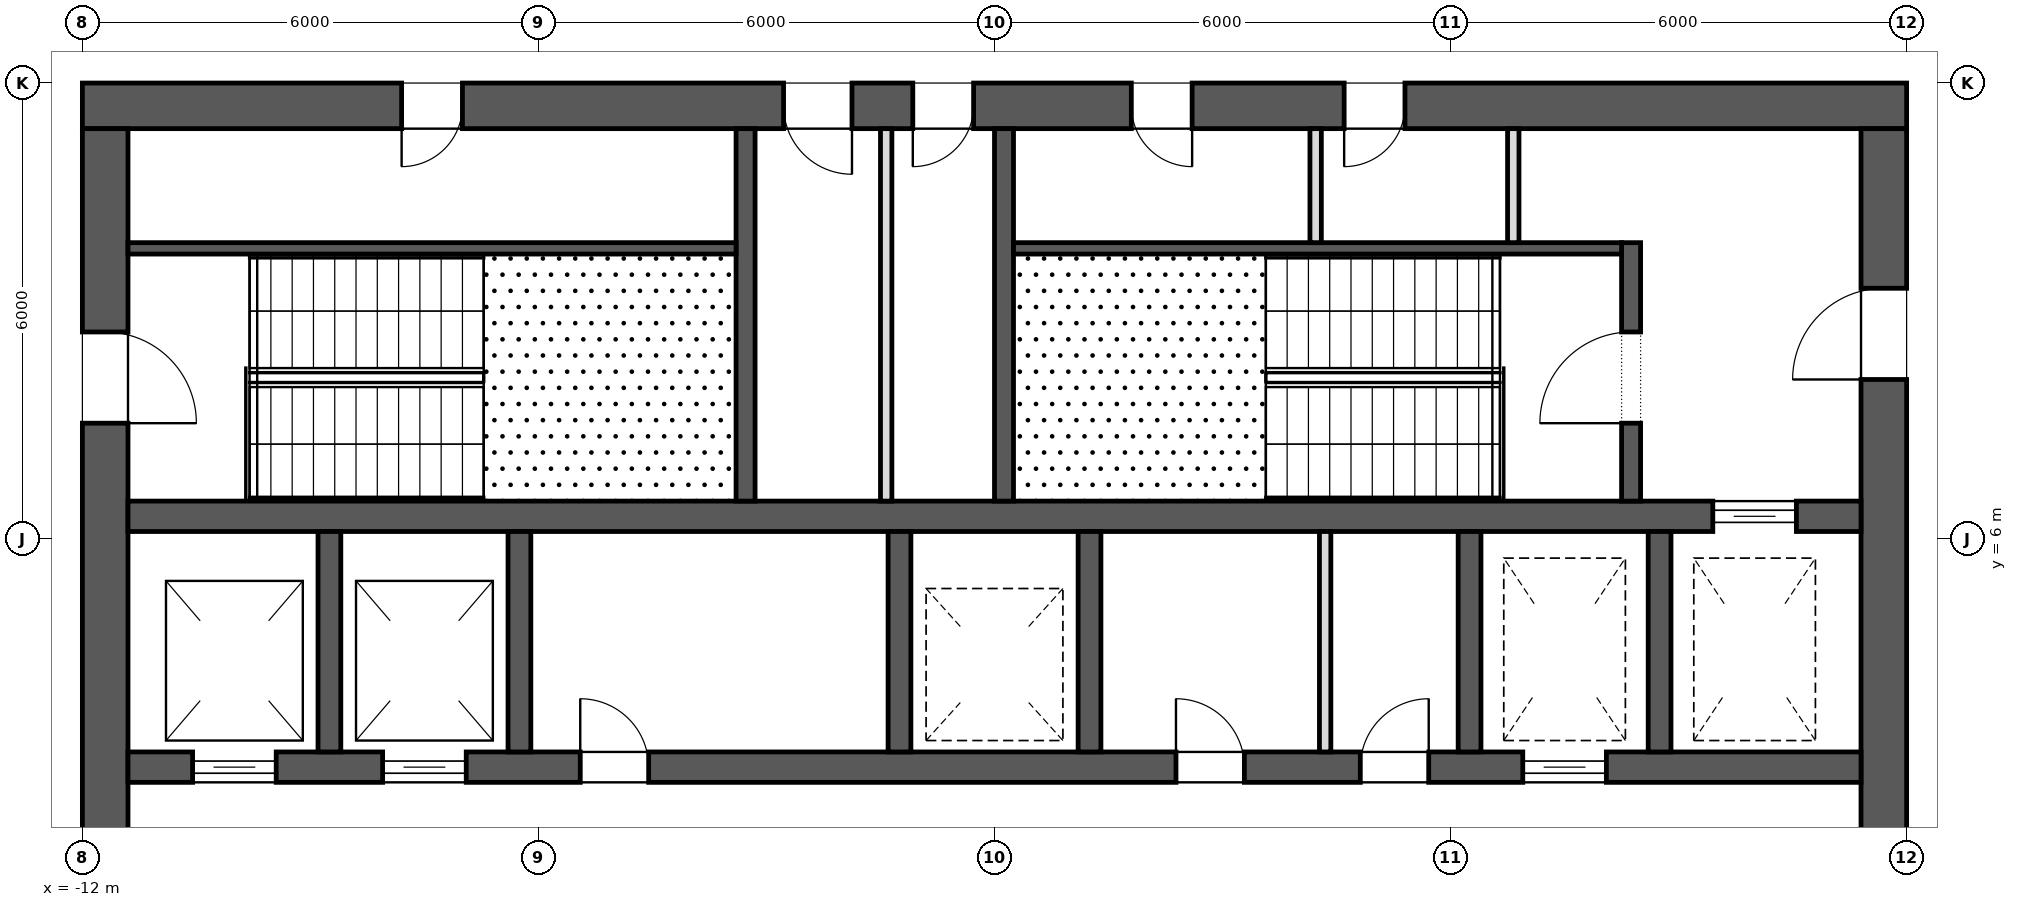
"""IFC4 building model, lengths in metres.
Left out: names, types, materials, properties, quantities, classifications, styles, units other than length and angle.
Written with IfcOpenShell. Run it as: python <this file> out.ifc"""

import sys

from ifc_helpers import new_model, si_unit, direction, frame, frame_2d, origin, place, context, subcontext, project, spatial, rectangle, extrude, element, fill, save


model = new_model("IFC4")
c1 = context("Model", 3, precision=1e-05, world=origin(), true_north=direction((0.0, 1.0)))
c2 = subcontext(c1, "Body", "Model", "MODEL_VIEW")
j1 = project(units=[si_unit("LENGTHUNIT", "METRE"), si_unit("PLANEANGLEUNIT", "RADIAN")], contexts=[c1])
p1 = place(None, origin())
s1 = spatial("IfcSite", under=j1, at=p1, CompositionType="ELEMENT")
p2 = place(p1, origin())
s2 = spatial("IfcBuilding", under=s1, at=p2, CompositionType="ELEMENT")
p3 = place(p2, frame((0.0, 0.0, 288.3)))
s3 = spatial("IfcBuildingStorey", under=s2, at=p3, CompositionType="ELEMENT", Elevation=288.3)
p4 = place(p3, frame((-12.0, 11.7, 0.0), z_axis=(0.0, 0.0, 1.0), x_axis=(1.0, 0.0, 0.0)))
e1 = element("IfcWall", 1, at=p4, inside=s3, PredefinedType="SHEAR", context=c2, shape_type="SweptSolid", body=[
    extrude(rectangle(XDim=24.0, YDim=0.6, at=frame_2d((12.0, 0.0))), origin(), (0.0, 0.0, 1.0), 4.0),
])
p5 = place(p4, frame((9.225, 0.0, 0.0)))
e2 = element("IfcOpeningElement", 2, at=p5, cuts=e1, PredefinedType="OPENING", context=c2, shape_type="SweptSolid", body=[
    extrude(rectangle(XDim=0.9, YDim=2.1, at=frame_2d((0.45, 1.05))), frame((0.0, 0.312, 0.0), z_axis=(0.0, -1.0, 0.0), x_axis=(1.0, 0.0, 0.0)), (0.0, 0.0, 1.0), 0.624),
])
p6 = place(p4, frame((10.925, 0.0, 0.0)))
e3 = element("IfcOpeningElement", 3, at=p6, cuts=e1, PredefinedType="OPENING", context=c2, shape_type="SweptSolid", body=[
    extrude(rectangle(XDim=0.8, YDim=2.1, at=frame_2d((0.4, 1.05))), frame((0.0, 0.312, 0.0), z_axis=(0.0, -1.0, 0.0), x_axis=(1.0, 0.0, 0.0)), (0.0, 0.0, 1.0), 0.624),
])
p7 = place(p4, frame((4.2, 0.0, 0.0)))
e4 = element("IfcOpeningElement", 4, at=p7, cuts=e1, PredefinedType="OPENING", context=c2, shape_type="SweptSolid", body=[
    extrude(rectangle(XDim=0.8, YDim=2.1, at=frame_2d((0.4, 1.05))), frame((0.0, 0.312, 0.0), z_axis=(0.0, -1.0, 0.0), x_axis=(1.0, 0.0, 0.0)), (0.0, 0.0, 1.0), 0.624),
])
p8 = place(p4, frame((13.8, 0.0, 0.0)))
e5 = element("IfcOpeningElement", 5, at=p8, cuts=e1, PredefinedType="OPENING", context=c2, shape_type="SweptSolid", body=[
    extrude(rectangle(XDim=0.8, YDim=2.1, at=frame_2d((0.4, 1.05))), frame((0.0, 0.312, 0.0), z_axis=(0.0, -1.0, 0.0), x_axis=(1.0, 0.0, 0.0)), (0.0, 0.0, 1.0), 0.624),
])
p9 = place(p4, frame((16.6, 0.0, 0.0)))
e6 = element("IfcOpeningElement", 6, at=p9, cuts=e1, PredefinedType="OPENING", context=c2, shape_type="SweptSolid", body=[
    extrude(rectangle(XDim=0.8, YDim=2.1, at=frame_2d((0.4, 1.05))), frame((0.0, 0.312, 0.0), z_axis=(0.0, -1.0, 0.0), x_axis=(1.0, 0.0, 0.0)), (0.0, 0.0, 1.0), 0.624),
])
p10 = place(p3, frame((11.7, -11.4, 0.0), z_axis=(0.0, 0.0, 1.0), x_axis=(0.0, 1.0, 0.0)))
e7 = element("IfcWall", 7, at=p10, inside=s3, PredefinedType="SHEAR", context=c2, shape_type="SweptSolid", body=[
    extrude(rectangle(XDim=22.8, YDim=0.6, at=frame_2d((11.4, 0.0))), origin(), (0.0, 0.0, 1.0), 4.0),
])
p11 = place(p10, frame((10.2, 0.0, 0.0)))
e8 = element("IfcOpeningElement", 8, at=p11, cuts=e7, PredefinedType="OPENING", context=c2, shape_type="SweptSolid", body=[
    extrude(rectangle(XDim=2.4, YDim=2.1, at=frame_2d((1.2, 1.05))), frame((0.0, 0.312, 0.0), z_axis=(0.0, -1.0, 0.0), x_axis=(1.0, 0.0, 0.0)), (0.0, 0.0, 1.0), 0.624),
])
p12 = place(p10, frame((19.5, 0.0, 0.0)))
e9 = element("IfcOpeningElement", 9, at=p12, cuts=e7, PredefinedType="OPENING", context=c2, shape_type="SweptSolid", body=[
    extrude(rectangle(XDim=1.2, YDim=2.1, at=frame_2d((0.6, 1.05))), frame((0.0, 0.312, 0.0), z_axis=(0.0, -1.0, 0.0), x_axis=(1.0, 0.0, 0.0)), (0.0, 0.0, 1.0), 0.624),
])
p13 = place(p10, frame((2.1, 0.0, 0.0)))
e10 = element("IfcOpeningElement", 10, at=p13, cuts=e7, PredefinedType="OPENING", context=c2, shape_type="SweptSolid", body=[
    extrude(rectangle(XDim=1.2, YDim=2.1, at=frame_2d((0.6, 1.05))), frame((0.0, 0.312, 0.0), z_axis=(0.0, -1.0, 0.0), x_axis=(1.0, 0.0, 0.0)), (0.0, 0.0, 1.0), 0.624),
])
p14 = place(p3, frame((-11.7, -11.4, 0.0), z_axis=(0.0, 0.0, 1.0), x_axis=(0.0, 1.0, 0.0)))
e11 = element("IfcWall", 11, at=p14, inside=s3, PredefinedType="SHEAR", context=c2, shape_type="SweptSolid", body=[
    extrude(rectangle(XDim=22.8, YDim=0.6, at=frame_2d((11.4, 0.0))), origin(), (0.0, 0.0, 1.0), 4.0),
])
p15 = place(p14, frame((10.2, 0.0, 0.0)))
e12 = element("IfcOpeningElement", 12, at=p15, cuts=e11, PredefinedType="OPENING", context=c2, shape_type="SweptSolid", body=[
    extrude(rectangle(XDim=2.4, YDim=2.1, at=frame_2d((1.2, 1.05))), frame((0.0, 0.312, 0.0), z_axis=(0.0, -1.0, 0.0), x_axis=(1.0, 0.0, 0.0)), (0.0, 0.0, 1.0), 0.624),
])
p16 = place(p14, frame((18.925, 0.0, 0.0)))
e13 = element("IfcOpeningElement", 13, at=p16, cuts=e11, PredefinedType="OPENING", context=c2, shape_type="SweptSolid", body=[
    extrude(rectangle(XDim=1.2, YDim=2.1, at=frame_2d((0.6, 1.05))), frame((0.0, 0.312, 0.0), z_axis=(0.0, -1.0, 0.0), x_axis=(1.0, 0.0, 0.0)), (0.0, 0.0, 1.0), 0.624),
])
p17 = place(p14, frame((2.675, 0.0, 0.0)))
e14 = element("IfcOpeningElement", 14, at=p17, cuts=e11, PredefinedType="OPENING", context=c2, shape_type="SweptSolid", body=[
    extrude(rectangle(XDim=1.2, YDim=2.1, at=frame_2d((0.6, 1.05))), frame((0.0, 0.312, 0.0), z_axis=(0.0, -1.0, 0.0), x_axis=(1.0, 0.0, 0.0)), (0.0, 0.0, 1.0), 0.624),
])
p18 = place(p3, frame((-11.4, 3.0, 0.0), z_axis=(0.0, 0.0, 1.0), x_axis=(1.0, 0.0, 0.0)))
e15 = element("IfcWall", 15, at=p18, inside=s3, PredefinedType="SHEAR", context=c2, shape_type="SweptSolid", body=[
    extrude(rectangle(XDim=22.8, YDim=0.4, at=frame_2d((11.4, 0.0))), origin(), (0.0, 0.0, 1.0), 4.0),
])
p19 = place(p18, frame((0.85, 0.0, 0.0)))
e16 = element("IfcOpeningElement", 16, at=p19, cuts=e15, PredefinedType="OPENING", context=c2, shape_type="SweptSolid", body=[
    extrude(rectangle(XDim=1.1, YDim=2.1, at=frame_2d((0.55, 1.05))), frame((0.0, 0.212, 0.0), z_axis=(0.0, -1.0, 0.0), x_axis=(1.0, 0.0, 0.0)), (0.0, 0.0, 1.0), 0.424),
])
p20 = place(p18, frame((3.35, 0.0, 0.0)))
e17 = element("IfcOpeningElement", 17, at=p20, cuts=e15, PredefinedType="OPENING", context=c2, shape_type="SweptSolid", body=[
    extrude(rectangle(XDim=1.1, YDim=2.1, at=frame_2d((0.55, 1.05))), frame((0.0, 0.212, 0.0), z_axis=(0.0, -1.0, 0.0), x_axis=(1.0, 0.0, 0.0)), (0.0, 0.0, 1.0), 0.424),
])
p21 = place(p18, frame((18.35, 0.0, 0.0)))
e18 = element("IfcOpeningElement", 18, at=p21, cuts=e15, PredefinedType="OPENING", context=c2, shape_type="SweptSolid", body=[
    extrude(rectangle(XDim=1.1, YDim=2.1, at=frame_2d((0.55, 1.05))), frame((0.0, 0.212, 0.0), z_axis=(0.0, -1.0, 0.0), x_axis=(1.0, 0.0, 0.0)), (0.0, 0.0, 1.0), 0.424),
])
p22 = place(p18, frame((13.788, 0.0, 0.0)))
e19 = element("IfcOpeningElement", 19, at=p22, cuts=e15, PredefinedType="OPENING", context=c2, shape_type="SweptSolid", body=[
    extrude(rectangle(XDim=0.9, YDim=2.1, at=frame_2d((0.45, 1.05))), frame((0.0, 0.212, 0.0), z_axis=(0.0, -1.0, 0.0), x_axis=(1.0, 0.0, 0.0)), (0.0, 0.0, 1.0), 0.424),
])
p23 = place(p18, frame((16.212, 0.0, 0.0)))
e20 = element("IfcOpeningElement", 20, at=p23, cuts=e15, PredefinedType="OPENING", context=c2, shape_type="SweptSolid", body=[
    extrude(rectangle(XDim=0.9, YDim=2.1, at=frame_2d((0.45, 1.05))), frame((0.0, 0.212, 0.0), z_axis=(0.0, -1.0, 0.0), x_axis=(1.0, 0.0, 0.0)), (0.0, 0.0, 1.0), 0.424),
])
p24 = place(p18, frame((5.95, 0.0, 0.0)))
e21 = element("IfcOpeningElement", 21, at=p24, cuts=e15, PredefinedType="OPENING", context=c2, shape_type="SweptSolid", body=[
    extrude(rectangle(XDim=0.9, YDim=2.1, at=frame_2d((0.45, 1.05))), frame((0.0, 0.212, 0.0), z_axis=(0.0, -1.0, 0.0), x_axis=(1.0, 0.0, 0.0)), (0.0, 0.0, 1.0), 0.424),
])
p25 = place(p3, frame((-11.4, 6.3, 0.0), z_axis=(0.0, 0.0, 1.0), x_axis=(1.0, 0.0, 0.0)))
e22 = element("IfcWall", 22, at=p25, inside=s3, PredefinedType="SHEAR", context=c2, shape_type="SweptSolid", body=[
    extrude(rectangle(XDim=22.8, YDim=0.4, at=frame_2d((11.4, 0.0))), origin(), (0.0, 0.0, 1.0), 4.0),
])
p26 = place(p25, frame((20.85, 0.0, 0.0)))
e23 = element("IfcOpeningElement", 23, at=p26, cuts=e22, PredefinedType="OPENING", context=c2, shape_type="SweptSolid", body=[
    extrude(rectangle(XDim=1.1, YDim=2.1, at=frame_2d((0.55, 1.05))), frame((0.0, 0.212, 0.0), z_axis=(0.0, -1.0, 0.0), x_axis=(1.0, 0.0, 0.0)), (0.0, 0.0, 1.0), 0.424),
])
for number, where, z_axis, x_axis in (
    (24, (-8.75, 3.2, 0.0), (0.0, 0.0, 1.0), (0.0, 1.0, 0.0)),
    (25, (-6.25, 3.2, 0.0), (0.0, 0.0, 1.0), (0.0, 1.0, 0.0)),
    (26, (-1.25, 3.2, 0.0), (0.0, 0.0, 1.0), (0.0, 1.0, 0.0)),
    (27, (1.25, 3.2, 0.0), (0.0, 0.0, 1.0), (0.0, 1.0, 0.0)),
    (28, (6.25, 3.2, 0.0), (0.0, 0.0, 1.0), (0.0, 1.0, 0.0)),
    (29, (8.75, 3.2, 0.0), (0.0, 0.0, 1.0), (0.0, 1.0, 0.0)),
):
    element("IfcWall", number, at=place(p3, frame(where, z_axis=z_axis, x_axis=x_axis)), inside=s3, PredefinedType="SHEAR", context=c2, shape_type="SweptSolid", body=[
        extrude(rectangle(XDim=2.9, YDim=0.3, at=frame_2d((1.45, 0.0))), origin(), (0.0, 0.0, 1.0), 4.0),
    ])
for number, where, z_axis, x_axis in (
    (30, (-3.275, 6.5, 0.0), (0.0, 0.0, 1.0), (0.0, 1.0, 0.0)),
    (31, (0.125, 6.5, 0.0), (0.0, 0.0, 1.0), (0.0, 1.0, 0.0)),
):
    element("IfcWall", number, at=place(p3, frame(where, z_axis=z_axis, x_axis=x_axis)), inside=s3, PredefinedType="SHEAR", context=c2, shape_type="SweptSolid", body=[
        extrude(rectangle(XDim=4.9, YDim=0.25, at=frame_2d((2.45, 0.0))), origin(), (0.0, 0.0, 1.0), 3.7),
    ])
p27 = place(p3, frame((8.375, 6.5, 0.0), z_axis=(0.0, 0.0, 1.0), x_axis=(0.0, 1.0, 0.0)))
e32 = element("IfcWall", 32, at=p27, inside=s3, PredefinedType="SHEAR", context=c2, shape_type="SweptSolid", body=[
    extrude(rectangle(XDim=3.4, YDim=0.25, at=frame_2d((1.7, 0.0))), origin(), (0.0, 0.0, 1.0), 3.7),
])
p28 = place(p27, frame((1.025, 0.0, 0.0)))
e33 = element("IfcOpeningElement", 33, at=p28, cuts=e32, PredefinedType="OPENING", context=c2, shape_type="SweptSolid", body=[
    extrude(rectangle(XDim=1.2, YDim=2.1, at=frame_2d((0.6, 1.05))), frame((0.0, 0.137, 0.0), z_axis=(0.0, -1.0, 0.0), x_axis=(1.0, 0.0, 0.0)), (0.0, 0.0, 1.0), 0.274),
])
for number, where, z_axis, x_axis in (
    (34, (-11.4, 9.825, 0.0), (0.0, 0.0, 1.0), (1.0, 0.0, 0.0)),
    (35, (0.25, 9.825, 0.0), (0.0, 0.0, 1.0), (1.0, 0.0, 0.0)),
):
    element("IfcWall", number, at=place(p3, frame(where, z_axis=z_axis, x_axis=x_axis)), inside=s3, PredefinedType="SHEAR", context=c2, shape_type="SweptSolid", body=[
        extrude(rectangle(XDim=8.0, YDim=0.15, at=frame_2d((4.0, 0.0))), origin(), (0.0, 0.0, 1.0), 3.7),
    ])
p29 = place(p3, frame((-1.425, 6.5, 0.0), z_axis=(0.0, 0.0, 1.0), x_axis=(0.0, 1.0, 0.0)))
e36 = element("IfcWall", 36, at=p29, inside=s3, PredefinedType="PARTITIONING", context=c2, shape_type="SweptSolid", body=[
    extrude(rectangle(XDim=4.9, YDim=0.15, at=frame_2d((2.45, 0.0))), origin(), (0.0, 0.0, 1.0), 3.7),
])
for number, where, z_axis, x_axis in (
    (37, (4.225, 9.9, 0.0), (0.0, 0.0, 1.0), (0.0, 1.0, 0.0)),
    (38, (6.825, 9.9, 0.0), (0.0, 0.0, 1.0), (0.0, 1.0, 0.0)),
):
    element("IfcWall", number, at=place(p3, frame(where, z_axis=z_axis, x_axis=x_axis)), inside=s3, PredefinedType="PARTITIONING", context=c2, shape_type="SweptSolid", body=[
        extrude(rectangle(XDim=1.5, YDim=0.15, at=frame_2d((0.75, 0.0))), origin(), (0.0, 0.0, 1.0), 3.7),
    ])
p30 = place(p3, frame((4.35, 3.2, 0.0), z_axis=(0.0, 0.0, 1.0), x_axis=(0.0, 1.0, 0.0)))
e39 = element("IfcWall", 39, at=p30, inside=s3, PredefinedType="PARTITIONING", context=c2, shape_type="SweptSolid", body=[
    extrude(rectangle(XDim=2.9, YDim=0.15, at=frame_2d((1.45, 0.0))), origin(), (0.0, 0.0, 1.0), 3.7),
])
p31 = place(p26, origin())
e40 = element("IfcDoor", 40, at=p31, inside=s3, OperationType="SLIDING_TO_LEFT", PredefinedType="DOOR", context=c2, shape_type="SweptSolid", body=[
    extrude(rectangle(XDim=1.1, YDim=2.1, at=frame_2d((0.55, 1.05))), frame((0.0, 0.025, 0.0), z_axis=(0.0, -1.0, 0.0), x_axis=(1.0, 0.0, 0.0)), (0.0, 0.0, 1.0), 0.05),
])
fill(e23, e40)
p32 = place(p19, origin())
e41 = element("IfcDoor", 41, at=p32, inside=s3, OperationType="SLIDING_TO_LEFT", PredefinedType="DOOR", context=c2, shape_type="SweptSolid", body=[
    extrude(rectangle(XDim=1.1, YDim=2.1, at=frame_2d((0.55, 1.05))), frame((0.0, 0.025, 0.0), z_axis=(0.0, -1.0, 0.0), x_axis=(1.0, 0.0, 0.0)), (0.0, 0.0, 1.0), 0.05),
])
fill(e16, e41)
p33 = place(p20, origin())
e42 = element("IfcDoor", 42, at=p33, inside=s3, OperationType="SLIDING_TO_LEFT", PredefinedType="DOOR", context=c2, shape_type="SweptSolid", body=[
    extrude(rectangle(XDim=1.1, YDim=2.1, at=frame_2d((0.55, 1.05))), frame((0.0, 0.025, 0.0), z_axis=(0.0, -1.0, 0.0), x_axis=(1.0, 0.0, 0.0)), (0.0, 0.0, 1.0), 0.05),
])
fill(e17, e42)
p34 = place(p21, origin())
e43 = element("IfcDoor", 43, at=p34, inside=s3, OperationType="SLIDING_TO_LEFT", PredefinedType="DOOR", context=c2, shape_type="SweptSolid", body=[
    extrude(rectangle(XDim=1.1, YDim=2.1, at=frame_2d((0.55, 1.05))), frame((0.0, 0.025, 0.0), z_axis=(0.0, -1.0, 0.0), x_axis=(1.0, 0.0, 0.0)), (0.0, 0.0, 1.0), 0.05),
])
fill(e18, e43)
p35 = place(p16, frame((1.2, 0.0, 0.0), z_axis=(0.0, 0.0, 1.0), x_axis=(-1.0, 0.0, 0.0)))
e44 = element("IfcDoor", 44, at=p35, inside=s3, OperationType="SINGLE_SWING_LEFT", PredefinedType="DOOR", context=c2, shape_type="SweptSolid", body=[
    extrude(rectangle(XDim=1.2, YDim=2.1, at=frame_2d((0.6, 1.05))), frame((0.0, 0.025, 0.0), z_axis=(0.0, -1.0, 0.0), x_axis=(1.0, 0.0, 0.0)), (0.0, 0.0, 1.0), 0.05),
])
fill(e13, e44)
p36 = place(p28, origin())
e45 = element("IfcDoor", 45, at=p36, inside=s3, OperationType="SINGLE_SWING_RIGHT", PredefinedType="DOOR", context=c2, shape_type="SweptSolid", body=[
    extrude(rectangle(XDim=1.2, YDim=2.1, at=frame_2d((0.6, 1.05))), frame((0.0, 0.025, 0.0), z_axis=(0.0, -1.0, 0.0), x_axis=(1.0, 0.0, 0.0)), (0.0, 0.0, 1.0), 0.05),
])
fill(e33, e45)
p37 = place(p12, origin())
e46 = element("IfcDoor", 46, at=p37, inside=s3, OperationType="SINGLE_SWING_RIGHT", PredefinedType="DOOR", context=c2, shape_type="SweptSolid", body=[
    extrude(rectangle(XDim=1.2, YDim=2.1, at=frame_2d((0.6, 1.05))), frame((0.0, 0.025, 0.0), z_axis=(0.0, -1.0, 0.0), x_axis=(1.0, 0.0, 0.0)), (0.0, 0.0, 1.0), 0.05),
])
fill(e9, e46)
p38 = place(p5, frame((0.9, 0.0, 0.0), z_axis=(0.0, 0.0, 1.0), x_axis=(-1.0, 0.0, 0.0)))
e47 = element("IfcDoor", 47, at=p38, inside=s3, OperationType="SINGLE_SWING_RIGHT", PredefinedType="DOOR", context=c2, shape_type="SweptSolid", body=[
    extrude(rectangle(XDim=0.9, YDim=2.1, at=frame_2d((0.45, 1.05))), frame((0.0, 0.025, 0.0), z_axis=(0.0, -1.0, 0.0), x_axis=(1.0, 0.0, 0.0)), (0.0, 0.0, 1.0), 0.05),
])
fill(e2, e47)
p39 = place(p6, frame((0.8, 0.0, 0.0), z_axis=(0.0, 0.0, 1.0), x_axis=(-1.0, 0.0, 0.0)))
e48 = element("IfcDoor", 48, at=p39, inside=s3, OperationType="SINGLE_SWING_LEFT", PredefinedType="DOOR", context=c2, shape_type="SweptSolid", body=[
    extrude(rectangle(XDim=0.8, YDim=2.1, at=frame_2d((0.4, 1.05))), frame((0.0, 0.025, 0.0), z_axis=(0.0, -1.0, 0.0), x_axis=(1.0, 0.0, 0.0)), (0.0, 0.0, 1.0), 0.05),
])
fill(e3, e48)
p40 = place(p7, frame((0.8, 0.0, 0.0), z_axis=(0.0, 0.0, 1.0), x_axis=(-1.0, 0.0, 0.0)))
e49 = element("IfcDoor", 49, at=p40, inside=s3, OperationType="SINGLE_SWING_LEFT", PredefinedType="DOOR", context=c2, shape_type="SweptSolid", body=[
    extrude(rectangle(XDim=0.8, YDim=2.1, at=frame_2d((0.4, 1.05))), frame((0.0, 0.025, 0.0), z_axis=(0.0, -1.0, 0.0), x_axis=(1.0, 0.0, 0.0)), (0.0, 0.0, 1.0), 0.05),
])
fill(e4, e49)
p41 = place(p8, frame((0.8, 0.0, 0.0), z_axis=(0.0, 0.0, 1.0), x_axis=(-1.0, 0.0, 0.0)))
e50 = element("IfcDoor", 50, at=p41, inside=s3, OperationType="SINGLE_SWING_RIGHT", PredefinedType="DOOR", context=c2, shape_type="SweptSolid", body=[
    extrude(rectangle(XDim=0.8, YDim=2.1, at=frame_2d((0.4, 1.05))), frame((0.0, 0.025, 0.0), z_axis=(0.0, -1.0, 0.0), x_axis=(1.0, 0.0, 0.0)), (0.0, 0.0, 1.0), 0.05),
])
fill(e5, e50)
p42 = place(p9, frame((0.8, 0.0, 0.0), z_axis=(0.0, 0.0, 1.0), x_axis=(-1.0, 0.0, 0.0)))
e51 = element("IfcDoor", 51, at=p42, inside=s3, OperationType="SINGLE_SWING_LEFT", PredefinedType="DOOR", context=c2, shape_type="SweptSolid", body=[
    extrude(rectangle(XDim=0.8, YDim=2.1, at=frame_2d((0.4, 1.05))), frame((0.0, 0.025, 0.0), z_axis=(0.0, -1.0, 0.0), x_axis=(1.0, 0.0, 0.0)), (0.0, 0.0, 1.0), 0.05),
])
fill(e6, e51)
p43 = place(p22, origin())
e52 = element("IfcDoor", 52, at=p43, inside=s3, OperationType="SINGLE_SWING_RIGHT", PredefinedType="DOOR", context=c2, shape_type="SweptSolid", body=[
    extrude(rectangle(XDim=0.9, YDim=2.1, at=frame_2d((0.45, 1.05))), frame((0.0, 0.025, 0.0), z_axis=(0.0, -1.0, 0.0), x_axis=(1.0, 0.0, 0.0)), (0.0, 0.0, 1.0), 0.05),
])
fill(e19, e52)
p44 = place(p23, origin())
e53 = element("IfcDoor", 53, at=p44, inside=s3, OperationType="SINGLE_SWING_LEFT", PredefinedType="DOOR", context=c2, shape_type="SweptSolid", body=[
    extrude(rectangle(XDim=0.9, YDim=2.1, at=frame_2d((0.45, 1.05))), frame((0.0, 0.025, 0.0), z_axis=(0.0, -1.0, 0.0), x_axis=(1.0, 0.0, 0.0)), (0.0, 0.0, 1.0), 0.05),
])
fill(e20, e53)
p45 = place(p24, origin())
e54 = element("IfcDoor", 54, at=p45, inside=s3, OperationType="SINGLE_SWING_RIGHT", PredefinedType="DOOR", context=c2, shape_type="SweptSolid", body=[
    extrude(rectangle(XDim=0.9, YDim=2.1, at=frame_2d((0.45, 1.05))), frame((0.0, 0.025, 0.0), z_axis=(0.0, -1.0, 0.0), x_axis=(1.0, 0.0, 0.0)), (0.0, 0.0, 1.0), 0.05),
])
fill(e21, e54)
save(model, sys.argv[1])
